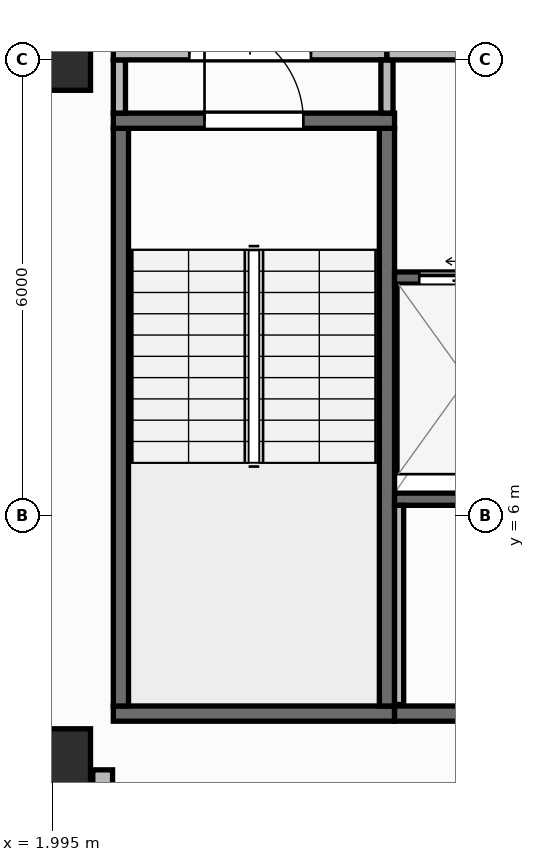
"""IFC4 building model, lengths in metres.
Left out: names, types, materials, properties, quantities, classifications, styles, units other than length and angle.
Written with IfcOpenShell. Run it as: python <this file> out.ifc"""

import sys

from ifc_helpers import new_model, si_unit, direction, frame, frame_2d, origin, origin_2d, place, context, subcontext, project, spatial, rectangle, extrude, element, fill, save


model = new_model("IFC4")
c1 = context("Model", 3, precision=1e-05, world=origin(), true_north=direction((0.0, 1.0)))
c2 = subcontext(c1, "Body", "Model", "MODEL_VIEW")
j1 = project(units=[si_unit("LENGTHUNIT", "METRE"), si_unit("PLANEANGLEUNIT", "RADIAN")], contexts=[c1])
p1 = place(None, origin())
s1 = spatial("IfcSite", under=j1, at=p1, CompositionType="ELEMENT")
p2 = place(p1, origin())
s2 = spatial("IfcBuilding", under=s1, at=p2, CompositionType="ELEMENT")
p3 = place(p2, frame((0.0, 0.0, 240.75)))
s3 = spatial("IfcBuildingStorey", under=s2, at=p3, CompositionType="ELEMENT", Elevation=240.75)
for number, where, z_axis, x_axis in (
    (1, (2.1, 2.8, 0.0), (0.0, 0.0, 1.0), (1.0, 0.0, 0.0)),
    (2, (2.1, 12.0, 0.0), (0.0, 0.0, 1.0), (1.0, 0.0, 0.0)),
):
    element("IfcColumn", number, at=place(p3, frame(where, z_axis=z_axis, x_axis=x_axis)), inside=s3, PredefinedType="COLUMN", context=c2, shape_type="SweptSolid", body=[
        extrude(rectangle(XDim=0.8, YDim=0.8, at=origin_2d()), origin(), (0.0, 0.0, 1.0), 3.95),
    ])
p4 = place(p3, frame((2.66, 2.66, 0.0), z_axis=(0.0, 0.0, 1.0), x_axis=(0.0, -1.0, 0.0)))
e3 = element("IfcWall", 3, at=p4, inside=s3, PredefinedType="STANDARD", context=c2, shape_type="SweptSolid", body=[
    extrude(rectangle(XDim=2.486, YDim=0.26, at=frame_2d((1.243, 0.0))), origin(), (0.0, 0.0, 1.0), 3.71),
])
p5 = place(p3, frame((2.66, 0.174, 0.0), z_axis=(0.0, 0.0, 1.0), x_axis=(0.996611813627, 0.082248969229, 0.0)))
e4 = element("IfcWall", 4, at=p5, inside=s3, PredefinedType="STANDARD", context=c2, shape_type="SweptSolid", body=[
    extrude(rectangle(XDim=41.019, YDim=0.26, at=frame_2d((20.51, 0.0))), origin(), (0.0, 0.0, 1.0), 3.71),
])
p6 = place(p5, frame((19.31, 0.0, 0.9)))
e5 = element("IfcOpeningElement", 5, at=p6, cuts=e4, PredefinedType="OPENING", context=c2, shape_type="SweptSolid", body=[
    extrude(rectangle(XDim=2.4, YDim=1.65, at=frame_2d((1.2, 0.825))), frame((0.0, 0.14, 0.0), z_axis=(0.0, -1.0, 0.0), x_axis=(1.0, 0.0, 0.0)), (0.0, 0.0, 1.0), 0.28),
])
p7 = place(p3, frame((2.8, 3.4, 0.0), z_axis=(0.0, 0.0, 1.0), x_axis=(1.0, 0.0, 0.0)))
e6 = element("IfcWall", 6, at=p7, inside=s3, PredefinedType="SHEAR", context=c2, shape_type="SweptSolid", body=[
    extrude(rectangle(XDim=3.7, YDim=0.2, at=frame_2d((1.85, 0.0))), origin(), (0.0, 0.0, 1.0), 3.71),
])
for number, where, z_axis, x_axis in (
    (7, (2.9, 3.5, 0.0), (0.0, 0.0, 1.0), (0.0, 1.0, 0.0)),
    (8, (6.4, 3.5, 0.0), (0.0, 0.0, 1.0), (0.0, 1.0, 0.0)),
):
    element("IfcWall", number, at=place(p3, frame(where, z_axis=z_axis, x_axis=x_axis)), inside=s3, PredefinedType="SHEAR", context=c2, shape_type="SweptSolid", body=[
        extrude(rectangle(XDim=7.6, YDim=0.2, at=frame_2d((3.8, 0.0))), origin(), (0.0, 0.0, 1.0), 3.71),
    ])
p8 = place(p3, frame((2.8, 11.2, 0.0), z_axis=(0.0, 0.0, 1.0), x_axis=(1.0, 0.0, 0.0)))
e9 = element("IfcWall", 9, at=p8, inside=s3, PredefinedType="SHEAR", context=c2, shape_type="SweptSolid", body=[
    extrude(rectangle(XDim=3.7, YDim=0.2, at=frame_2d((1.85, 0.0))), origin(), (0.0, 0.0, 1.0), 3.71),
])
p9 = place(p8, frame((1.2, 0.0, 0.0)))
e10 = element("IfcOpeningElement", 10, at=p9, cuts=e9, PredefinedType="OPENING", context=c2, shape_type="SweptSolid", body=[
    extrude(rectangle(XDim=1.3, YDim=2.15, at=frame_2d((0.65, 1.075))), frame((0.0, 0.11, 0.0), z_axis=(0.0, -1.0, 0.0), x_axis=(1.0, 0.0, 0.0)), (0.0, 0.0, 1.0), 0.22),
])
p10 = place(p3, frame((6.5, 3.4, 0.0), z_axis=(0.0, 0.0, 1.0), x_axis=(1.0, 0.0, 0.0)))
e11 = element("IfcWall", 11, at=p10, inside=s3, PredefinedType="SHEAR", context=c2, shape_type="SweptSolid", body=[
    extrude(rectangle(XDim=13.7, YDim=0.2, at=frame_2d((6.85, 0.0))), origin(), (0.0, 0.0, 1.0), 3.71),
])
p11 = place(p3, frame((6.5, 6.22, 0.0), z_axis=(0.0, 0.0, 1.0), x_axis=(1.0, 0.0, 0.0)))
e12 = element("IfcWall", 12, at=p11, inside=s3, PredefinedType="SHEAR", context=c2, shape_type="SweptSolid", body=[
    extrude(rectangle(XDim=12.11, YDim=0.16, at=frame_2d((6.055, 0.0))), origin(), (0.0, 0.0, 1.0), 3.71),
])
p12 = place(p3, frame((6.5, 9.13, 0.0), z_axis=(0.0, 0.0, 1.0), x_axis=(1.0, 0.0, 0.0)))
e13 = element("IfcWall", 13, at=p12, inside=s3, PredefinedType="SHEAR", context=c2, shape_type="SweptSolid", body=[
    extrude(rectangle(XDim=1.975, YDim=0.16, at=frame_2d((0.988, 0.0))), origin(), (0.0, 0.0, 1.0), 3.71),
])
p13 = place(p12, frame((0.325, 0.0, 0.0)))
e14 = element("IfcOpeningElement", 14, at=p13, cuts=e13, PredefinedType="OPENING", context=c2, shape_type="SweptSolid", body=[
    extrude(rectangle(XDim=1.25, YDim=2.15, at=frame_2d((0.625, 1.075))), frame((0.0, 0.09, 0.0), z_axis=(0.0, -1.0, 0.0), x_axis=(1.0, 0.0, 0.0)), (0.0, 0.0, 1.0), 0.18),
])
p14 = place(p3, frame((6.56, 3.52, 0.0), z_axis=(0.0, 0.0, 1.0), x_axis=(0.0, 1.0, 0.0)))
e15 = element("IfcWall", 15, at=p14, inside=s3, PredefinedType="PARTITIONING", context=c2, shape_type="SweptSolid", body=[
    extrude(rectangle(XDim=2.62, YDim=0.12, at=frame_2d((1.31, 0.0))), origin(), (0.0, 0.0, 1.0), 3.71),
])
p15 = place(p3, frame((2.88, 11.3, 0.0), z_axis=(0.0, 0.0, 1.0), x_axis=(0.0, 1.0, 0.0)))
e16 = element("IfcWall", 16, at=p15, inside=s3, PredefinedType="PARTITIONING", context=c2, shape_type="SweptSolid", body=[
    extrude(rectangle(XDim=0.7, YDim=0.16, at=frame_2d((0.35, 0.0))), origin(), (0.0, 0.0, 1.0), 3.71),
])
p16 = place(p3, frame((2.8, 12.08, 0.0), z_axis=(0.0, 0.0, 1.0), x_axis=(1.0, 0.0, 0.0)))
e17 = element("IfcWall", 17, at=p16, inside=s3, PredefinedType="PARTITIONING", context=c2, shape_type="SweptSolid", body=[
    extrude(rectangle(XDim=3.6, YDim=0.16, at=frame_2d((1.8, 0.0))), origin(), (0.0, 0.0, 1.0), 3.157),
])
p17 = place(p16, frame((1.0, 0.0, 0.0)))
e18 = element("IfcOpeningElement", 18, at=p17, cuts=e17, PredefinedType="OPENING", context=c2, shape_type="SweptSolid", body=[
    extrude(rectangle(XDim=1.6, YDim=2.05, at=frame_2d((0.8, 1.025))), frame((0.0, 0.09, 0.0), z_axis=(0.0, -1.0, 0.0), x_axis=(1.0, 0.0, 0.0)), (0.0, 0.0, 1.0), 0.18),
])
p18 = place(p3, frame((6.4, 11.3, 0.0), z_axis=(0.0, 0.0, 1.0), x_axis=(0.0, 1.0, 0.0)))
e19 = element("IfcWall", 19, at=p18, inside=s3, PredefinedType="PARTITIONING", context=c2, shape_type="SweptSolid", body=[
    extrude(rectangle(XDim=0.7, YDim=0.16, at=frame_2d((0.35, 0.0))), origin(), (0.0, 0.0, 1.0), 3.71),
])
p19 = place(p3, frame((6.4, 12.08, 0.0), z_axis=(0.0, 0.0, 1.0), x_axis=(1.0, 0.0, 0.0)))
e20 = element("IfcWall", 20, at=p19, inside=s3, PredefinedType="PARTITIONING", context=c2, shape_type="SweptSolid", body=[
    extrude(rectangle(XDim=6.18, YDim=0.16, at=frame_2d((3.09, 0.0))), origin(), (0.0, 0.0, 1.0), 3.157),
])
p20 = place(p19, frame((2.29, 0.0, 0.0)))
e21 = element("IfcOpeningElement", 21, at=p20, cuts=e20, PredefinedType="OPENING", context=c2, shape_type="SweptSolid", body=[
    extrude(rectangle(XDim=1.6, YDim=2.05, at=frame_2d((0.8, 1.025))), frame((0.0, 0.09, 0.0), z_axis=(0.0, -1.0, 0.0), x_axis=(1.0, 0.0, 0.0)), (0.0, 0.0, 1.0), 0.18),
])
p21 = place(p9, origin())
e22 = element("IfcDoor", 22, at=p21, inside=s3, OperationType="SINGLE_SWING_LEFT", PredefinedType="DOOR", context=c2, shape_type="SweptSolid", body=[
    extrude(rectangle(XDim=1.3, YDim=2.15, at=frame_2d((0.65, 1.075))), frame((0.0, 0.025, 0.0), z_axis=(0.0, -1.0, 0.0), x_axis=(1.0, 0.0, 0.0)), (0.0, 0.0, 1.0), 0.05),
])
fill(e10, e22)
p22 = place(p13, origin())
e23 = element("IfcDoor", 23, at=p22, inside=s3, OperationType="SLIDING_TO_LEFT", PredefinedType="DOOR", context=c2, shape_type="SweptSolid", body=[
    extrude(rectangle(XDim=1.25, YDim=2.15, at=frame_2d((0.625, 1.075))), frame((0.0, 0.025, 0.0), z_axis=(0.0, -1.0, 0.0), x_axis=(1.0, 0.0, 0.0)), (0.0, 0.0, 1.0), 0.05),
])
fill(e14, e23)
p23 = place(p17, origin())
e24 = element("IfcDoor", 24, at=p23, inside=s3, OperationType="DOUBLE_DOOR_SINGLE_SWING", PredefinedType="DOOR", context=c2, shape_type="SweptSolid", body=[
    extrude(rectangle(XDim=1.6, YDim=2.05, at=frame_2d((0.8, 1.025))), frame((0.0, 0.025, 0.0), z_axis=(0.0, -1.0, 0.0), x_axis=(1.0, 0.0, 0.0)), (0.0, 0.0, 1.0), 0.05),
])
fill(e18, e24)
save(model, sys.argv[1])
